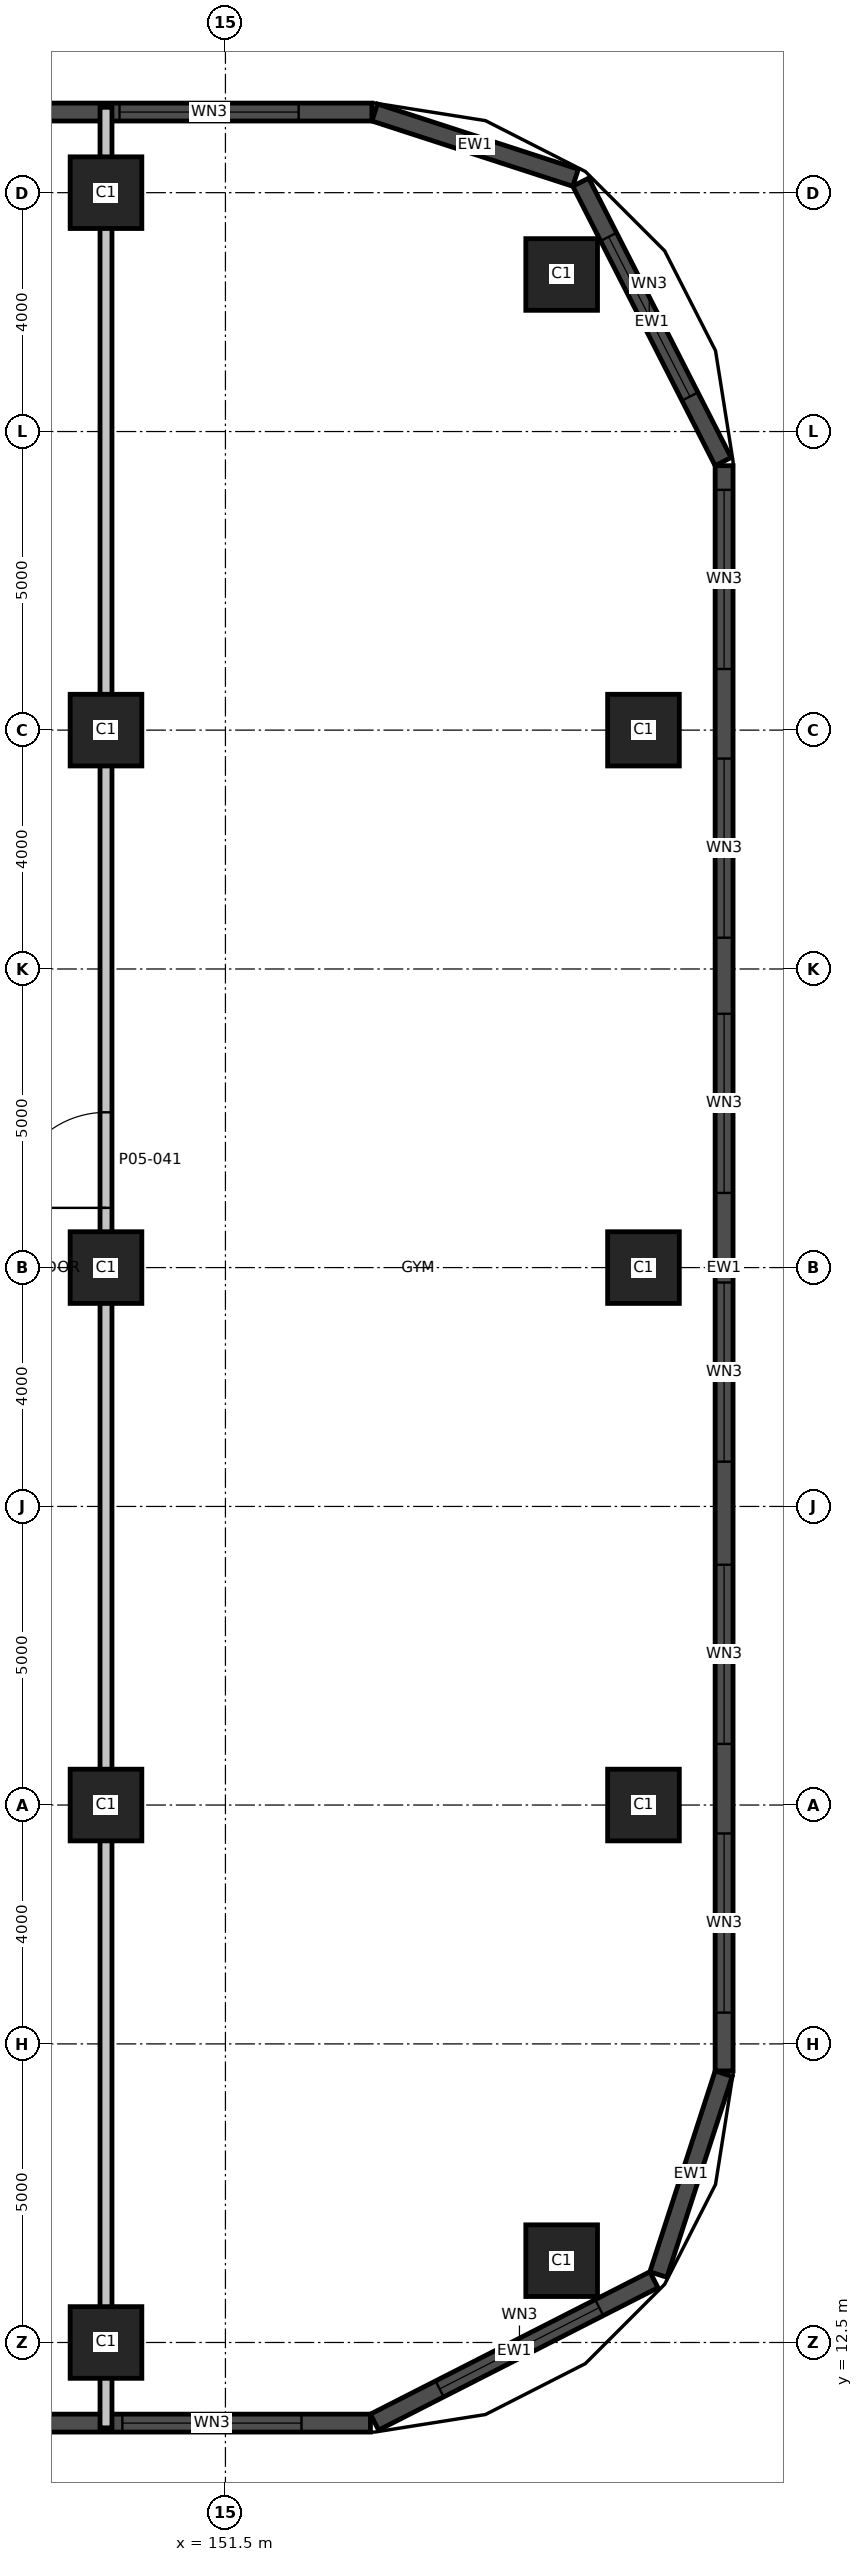
"""IFC4 building model, lengths in metres.
Left out: names, types, materials, properties, quantities, classifications, styles, units other than length and angle.
Written with IfcOpenShell. Run it as: python <this file> out.ifc"""

import sys

from ifc_helpers import new_model, si_unit, direction, frame, frame_2d, origin, origin_2d, place, context, subcontext, project, spatial, rectangle, extrude, element, fill, save


model = new_model("IFC4")
c1 = context("Model", 3, precision=1e-05, world=origin(), true_north=direction((0.0, 1.0)))
c2 = subcontext(c1, "Body", "Model", "MODEL_VIEW")
j1 = project(units=[si_unit("LENGTHUNIT", "METRE"), si_unit("PLANEANGLEUNIT", "RADIAN")], contexts=[c1])
p1 = place(None, origin())
s1 = spatial("IfcSite", under=j1, at=p1, CompositionType="ELEMENT")
p2 = place(p1, origin())
s2 = spatial("IfcBuilding", under=s1, at=p2, CompositionType="ELEMENT")
p3 = place(p2, frame((0.0, 0.0, 28.5)))
s3 = spatial("IfcBuildingStorey", under=s2, at=p3, CompositionType="ELEMENT", Elevation=28.5)
for number, where, z_axis, x_axis in (
    (1, (149.5, 12.5, 0.0), (0.0, 0.0, 1.0), (1.0, 0.0, 0.0)),
    (2, (157.13, 13.87, 0.0), (0.0, 0.0, 1.0), (1.0, 0.0, 0.0)),
    (3, (149.5, 21.5, 0.0), (0.0, 0.0, 1.0), (1.0, 0.0, 0.0)),
    (4, (158.5, 21.5, 0.0), (0.0, 0.0, 1.0), (1.0, 0.0, 0.0)),
    (5, (149.5, 30.5, 0.0), (0.0, 0.0, 1.0), (1.0, 0.0, 0.0)),
    (6, (158.5, 30.5, 0.0), (0.0, 0.0, 1.0), (1.0, 0.0, 0.0)),
    (7, (149.5, 39.5, 0.0), (0.0, 0.0, 1.0), (1.0, 0.0, 0.0)),
    (8, (158.5, 39.5, 0.0), (0.0, 0.0, 1.0), (1.0, 0.0, 0.0)),
    (9, (157.13, 47.13, 0.0), (0.0, 0.0, 1.0), (1.0, 0.0, 0.0)),
    (10, (149.5, 48.5, 0.0), (0.0, 0.0, 1.0), (1.0, 0.0, 0.0)),
):
    element("IfcColumn", number, at=place(p3, frame(where, z_axis=z_axis, x_axis=x_axis)), inside=s3, PredefinedType="COLUMN", context=c2, shape_type="SweptSolid", body=[
        extrude(rectangle(XDim=1.2, YDim=1.2, at=origin_2d()), origin(), (0.0, 0.0, 1.0), 5.0),
    ])
p4 = place(p3, frame((118.048, 11.15, 0.0), z_axis=(0.0, 0.0, 1.0), x_axis=(1.0, 0.0, 0.0)))
e11 = element("IfcWall", 11, at=p4, inside=s3, PredefinedType="SOLIDWALL", context=c2, shape_type="SweptSolid", body=[
    extrude(rectangle(XDim=35.88, YDim=0.3, at=frame_2d((17.94, 0.0))), origin(), (0.0, 0.0, 1.0), 4.7),
])
p5 = place(p4, frame((4.202, 0.0, 0.9)))
e12 = element("IfcOpeningElement", 12, at=p5, cuts=e11, PredefinedType="OPENING", context=c2, shape_type="SweptSolid", body=[
    extrude(rectangle(XDim=3.0, YDim=2.4, at=frame_2d((1.5, 1.2))), frame((0.0, 0.16, 0.0), z_axis=(0.0, -1.0, 0.0), x_axis=(1.0, 0.0, 0.0)), (0.0, 0.0, 1.0), 0.32),
])
p6 = place(p4, frame((8.702, 0.0, 0.9)))
e13 = element("IfcOpeningElement", 13, at=p6, cuts=e11, PredefinedType="OPENING", context=c2, shape_type="SweptSolid", body=[
    extrude(rectangle(XDim=3.0, YDim=2.4, at=frame_2d((1.5, 1.2))), frame((0.0, 0.16, 0.0), z_axis=(0.0, -1.0, 0.0), x_axis=(1.0, 0.0, 0.0)), (0.0, 0.0, 1.0), 0.32),
])
p7 = place(p4, frame((17.702, 0.0, 0.9)))
e14 = element("IfcOpeningElement", 14, at=p7, cuts=e11, PredefinedType="OPENING", context=c2, shape_type="SweptSolid", body=[
    extrude(rectangle(XDim=3.0, YDim=2.4, at=frame_2d((1.5, 1.2))), frame((0.0, 0.16, 0.0), z_axis=(0.0, -1.0, 0.0), x_axis=(1.0, 0.0, 0.0)), (0.0, 0.0, 1.0), 0.32),
])
p8 = place(p4, frame((31.726, 0.0, 0.9)))
e15 = element("IfcOpeningElement", 15, at=p8, cuts=e11, PredefinedType="OPENING", context=c2, shape_type="SweptSolid", body=[
    extrude(rectangle(XDim=3.0, YDim=2.4, at=frame_2d((1.5, 1.2))), frame((0.0, 0.16, 0.0), z_axis=(0.0, -1.0, 0.0), x_axis=(1.0, 0.0, 0.0)), (0.0, 0.0, 1.0), 0.32),
])
p9 = place(p3, frame((153.996, 11.166, 0.0), z_axis=(0.0, 0.0, 1.0), x_axis=(0.890998339455, 0.454006562826, 0.0)))
e16 = element("IfcWall", 16, at=p9, inside=s3, PredefinedType="SOLIDWALL", context=c2, shape_type="SweptSolid", body=[
    extrude(rectangle(XDim=5.252, YDim=0.3, at=frame_2d((2.626, 0.0))), origin(), (0.0, 0.0, 1.0), 4.7),
])
p10 = place(p9, frame((1.224, 0.0, 0.9)))
e17 = element("IfcOpeningElement", 17, at=p10, cuts=e16, PredefinedType="OPENING", context=c2, shape_type="SweptSolid", body=[
    extrude(rectangle(XDim=3.0, YDim=2.4, at=frame_2d((1.5, 1.2))), frame((0.0, 0.16, 0.0), z_axis=(0.0, -1.0, 0.0), x_axis=(1.0, 0.0, 0.0)), (0.0, 0.0, 1.0), 0.32),
])
p11 = place(p3, frame((158.75, 13.638, 0.0), z_axis=(0.0, 0.0, 1.0), x_axis=(0.309073584194, 0.951038127287, 0.0)))
e18 = element("IfcWall", 18, at=p11, inside=s3, PredefinedType="SOLIDWALL", context=c2, shape_type="SweptSolid", body=[
    extrude(rectangle(XDim=3.536, YDim=0.3, at=frame_2d((1.768, 0.0))), origin(), (0.0, 0.0, 1.0), 4.7),
])
p12 = place(p3, frame((159.85, 17.048, 0.0), z_axis=(0.0, 0.0, 1.0), x_axis=(0.0, 1.0, 0.0)))
e19 = element("IfcWall", 19, at=p12, inside=s3, PredefinedType="SOLIDWALL", context=c2, shape_type="SweptSolid", body=[
    extrude(rectangle(XDim=26.88, YDim=0.3, at=frame_2d((13.44, 0.0))), origin(), (0.0, 0.0, 1.0), 4.7),
])
p13 = place(p12, frame((0.976, 0.0, 0.9)))
e20 = element("IfcOpeningElement", 20, at=p13, cuts=e19, PredefinedType="OPENING", context=c2, shape_type="SweptSolid", body=[
    extrude(rectangle(XDim=3.0, YDim=2.4, at=frame_2d((1.5, 1.2))), frame((0.0, 0.16, 0.0), z_axis=(0.0, -1.0, 0.0), x_axis=(1.0, 0.0, 0.0)), (0.0, 0.0, 1.0), 0.32),
])
p14 = place(p12, frame((5.476, 0.0, 0.9)))
e21 = element("IfcOpeningElement", 21, at=p14, cuts=e19, PredefinedType="OPENING", context=c2, shape_type="SweptSolid", body=[
    extrude(rectangle(XDim=3.0, YDim=2.4, at=frame_2d((1.5, 1.2))), frame((0.0, 0.16, 0.0), z_axis=(0.0, -1.0, 0.0), x_axis=(1.0, 0.0, 0.0)), (0.0, 0.0, 1.0), 0.32),
])
p15 = place(p12, frame((10.202, 0.0, 0.9)))
e22 = element("IfcOpeningElement", 22, at=p15, cuts=e19, PredefinedType="OPENING", context=c2, shape_type="SweptSolid", body=[
    extrude(rectangle(XDim=3.0, YDim=2.4, at=frame_2d((1.5, 1.2))), frame((0.0, 0.16, 0.0), z_axis=(0.0, -1.0, 0.0), x_axis=(1.0, 0.0, 0.0)), (0.0, 0.0, 1.0), 0.32),
])
p16 = place(p12, frame((14.702, 0.0, 0.9)))
e23 = element("IfcOpeningElement", 23, at=p16, cuts=e19, PredefinedType="OPENING", context=c2, shape_type="SweptSolid", body=[
    extrude(rectangle(XDim=3.0, YDim=2.4, at=frame_2d((1.5, 1.2))), frame((0.0, 0.16, 0.0), z_axis=(0.0, -1.0, 0.0), x_axis=(1.0, 0.0, 0.0)), (0.0, 0.0, 1.0), 0.32),
])
p17 = place(p12, frame((18.976, 0.0, 0.9)))
e24 = element("IfcOpeningElement", 24, at=p17, cuts=e19, PredefinedType="OPENING", context=c2, shape_type="SweptSolid", body=[
    extrude(rectangle(XDim=3.0, YDim=2.4, at=frame_2d((1.5, 1.2))), frame((0.0, 0.16, 0.0), z_axis=(0.0, -1.0, 0.0), x_axis=(1.0, 0.0, 0.0)), (0.0, 0.0, 1.0), 0.32),
])
p18 = place(p12, frame((23.476, 0.0, 0.9)))
e25 = element("IfcOpeningElement", 25, at=p18, cuts=e19, PredefinedType="OPENING", context=c2, shape_type="SweptSolid", body=[
    extrude(rectangle(XDim=3.0, YDim=2.4, at=frame_2d((1.5, 1.2))), frame((0.0, 0.16, 0.0), z_axis=(0.0, -1.0, 0.0), x_axis=(1.0, 0.0, 0.0)), (0.0, 0.0, 1.0), 0.32),
])
p19 = place(p3, frame((159.834, 43.996, 0.0), z_axis=(0.0, 0.0, 1.0), x_axis=(-0.454006562826, 0.890998339455, 0.0)))
e26 = element("IfcWall", 26, at=p19, inside=s3, PredefinedType="SOLIDWALL", context=c2, shape_type="SweptSolid", body=[
    extrude(rectangle(XDim=5.252, YDim=0.3, at=frame_2d((2.626, 0.0))), origin(), (0.0, 0.0, 1.0), 4.7),
])
p20 = place(p19, frame((1.224, 0.0, 0.9)))
e27 = element("IfcOpeningElement", 27, at=p20, cuts=e26, PredefinedType="OPENING", context=c2, shape_type="SweptSolid", body=[
    extrude(rectangle(XDim=3.0, YDim=2.4, at=frame_2d((1.5, 1.2))), frame((0.0, 0.16, 0.0), z_axis=(0.0, -1.0, 0.0), x_axis=(1.0, 0.0, 0.0)), (0.0, 0.0, 1.0), 0.32),
])
p21 = place(p3, frame((157.362, 48.75, 0.0), z_axis=(0.0, 0.0, 1.0), x_axis=(-0.951038127287, 0.309073584194, 0.0)))
e28 = element("IfcWall", 28, at=p21, inside=s3, PredefinedType="SOLIDWALL", context=c2, shape_type="SweptSolid", body=[
    extrude(rectangle(XDim=3.536, YDim=0.3, at=frame_2d((1.768, 0.0))), origin(), (0.0, 0.0, 1.0), 4.7),
])
p22 = place(p3, frame((153.952, 49.85, 0.0), z_axis=(0.0, 0.0, 1.0), x_axis=(-1.0, 0.0, 0.0)))
e29 = element("IfcWall", 29, at=p22, inside=s3, PredefinedType="SOLIDWALL", context=c2, shape_type="SweptSolid", body=[
    extrude(rectangle(XDim=35.88, YDim=0.3, at=frame_2d((17.94, 0.0))), origin(), (0.0, 0.0, 1.0), 4.7),
])
p23 = place(p22, frame((1.226, 0.0, 0.9)))
e30 = element("IfcOpeningElement", 30, at=p23, cuts=e29, PredefinedType="OPENING", context=c2, shape_type="SweptSolid", body=[
    extrude(rectangle(XDim=3.0, YDim=2.4, at=frame_2d((1.5, 1.2))), frame((0.0, 0.16, 0.0), z_axis=(0.0, -1.0, 0.0), x_axis=(1.0, 0.0, 0.0)), (0.0, 0.0, 1.0), 0.32),
])
p24 = place(p22, frame((10.702, 0.0, 0.9)))
e31 = element("IfcOpeningElement", 31, at=p24, cuts=e29, PredefinedType="OPENING", context=c2, shape_type="SweptSolid", body=[
    extrude(rectangle(XDim=3.0, YDim=2.4, at=frame_2d((1.5, 1.2))), frame((0.0, 0.16, 0.0), z_axis=(0.0, -1.0, 0.0), x_axis=(1.0, 0.0, 0.0)), (0.0, 0.0, 1.0), 0.32),
])
p25 = place(p22, frame((19.702, 0.0, 0.9)))
e32 = element("IfcOpeningElement", 32, at=p25, cuts=e29, PredefinedType="OPENING", context=c2, shape_type="SweptSolid", body=[
    extrude(rectangle(XDim=3.0, YDim=2.4, at=frame_2d((1.5, 1.2))), frame((0.0, 0.16, 0.0), z_axis=(0.0, -1.0, 0.0), x_axis=(1.0, 0.0, 0.0)), (0.0, 0.0, 1.0), 0.32),
])
p26 = place(p22, frame((24.202, 0.0, 0.9)))
e33 = element("IfcOpeningElement", 33, at=p26, cuts=e29, PredefinedType="OPENING", context=c2, shape_type="SweptSolid", body=[
    extrude(rectangle(XDim=3.0, YDim=2.4, at=frame_2d((1.5, 1.2))), frame((0.0, 0.16, 0.0), z_axis=(0.0, -1.0, 0.0), x_axis=(1.0, 0.0, 0.0)), (0.0, 0.0, 1.0), 0.32),
])
p27 = place(p22, frame((28.702, 0.0, 0.9)))
e34 = element("IfcOpeningElement", 34, at=p27, cuts=e29, PredefinedType="OPENING", context=c2, shape_type="SweptSolid", body=[
    extrude(rectangle(XDim=3.0, YDim=2.4, at=frame_2d((1.5, 1.2))), frame((0.0, 0.16, 0.0), z_axis=(0.0, -1.0, 0.0), x_axis=(1.0, 0.0, 0.0)), (0.0, 0.0, 1.0), 0.32),
])
p28 = place(p3, frame((149.5, 11.07, 0.0), z_axis=(0.0, 0.0, 1.0), x_axis=(0.0, 1.0, 0.0)))
e35 = element("IfcWall", 35, at=p28, inside=s3, PredefinedType="PARTITIONING", context=c2, shape_type="SweptSolid", body=[
    extrude(rectangle(XDim=38.86, YDim=0.2, at=frame_2d((19.43, 0.0))), origin(), (0.0, 0.0, 1.0), 3.8),
])
p29 = place(p28, frame((20.43, 0.0, 0.0)))
e36 = element("IfcOpeningElement", 36, at=p29, cuts=e35, PredefinedType="OPENING", context=c2, shape_type="SweptSolid", body=[
    extrude(rectangle(XDim=1.6, YDim=2.1, at=frame_2d((0.8, 1.05))), frame((0.0, 0.11, 0.0), z_axis=(0.0, -1.0, 0.0), x_axis=(1.0, 0.0, 0.0)), (0.0, 0.0, 1.0), 0.22),
])
p30 = place(p8, origin())
e37 = element("IfcWindow", 37, at=p30, inside=s3, PartitioningType="SINGLE_PANEL", PredefinedType="WINDOW", context=c2, shape_type="SweptSolid", body=[
    extrude(rectangle(XDim=3.0, YDim=2.4, at=frame_2d((1.5, 1.2))), frame((0.0, 0.03, 0.0), z_axis=(0.0, -1.0, 0.0), x_axis=(1.0, 0.0, 0.0)), (0.0, 0.0, 1.0), 0.06),
])
fill(e15, e37)
p31 = place(p10, origin())
e38 = element("IfcWindow", 38, at=p31, inside=s3, PartitioningType="SINGLE_PANEL", PredefinedType="WINDOW", context=c2, shape_type="SweptSolid", body=[
    extrude(rectangle(XDim=3.0, YDim=2.4, at=frame_2d((1.5, 1.2))), frame((0.0, 0.03, 0.0), z_axis=(0.0, -1.0, 0.0), x_axis=(1.0, 0.0, 0.0)), (0.0, 0.0, 1.0), 0.06),
])
fill(e17, e38)
p32 = place(p13, origin())
e39 = element("IfcWindow", 39, at=p32, inside=s3, PartitioningType="SINGLE_PANEL", PredefinedType="WINDOW", context=c2, shape_type="SweptSolid", body=[
    extrude(rectangle(XDim=3.0, YDim=2.4, at=frame_2d((1.5, 1.2))), frame((0.0, 0.03, 0.0), z_axis=(0.0, -1.0, 0.0), x_axis=(1.0, 0.0, 0.0)), (0.0, 0.0, 1.0), 0.06),
])
fill(e20, e39)
p33 = place(p14, origin())
e40 = element("IfcWindow", 40, at=p33, inside=s3, PartitioningType="SINGLE_PANEL", PredefinedType="WINDOW", context=c2, shape_type="SweptSolid", body=[
    extrude(rectangle(XDim=3.0, YDim=2.4, at=frame_2d((1.5, 1.2))), frame((0.0, 0.03, 0.0), z_axis=(0.0, -1.0, 0.0), x_axis=(1.0, 0.0, 0.0)), (0.0, 0.0, 1.0), 0.06),
])
fill(e21, e40)
p34 = place(p15, origin())
e41 = element("IfcWindow", 41, at=p34, inside=s3, PartitioningType="SINGLE_PANEL", PredefinedType="WINDOW", context=c2, shape_type="SweptSolid", body=[
    extrude(rectangle(XDim=3.0, YDim=2.4, at=frame_2d((1.5, 1.2))), frame((0.0, 0.03, 0.0), z_axis=(0.0, -1.0, 0.0), x_axis=(1.0, 0.0, 0.0)), (0.0, 0.0, 1.0), 0.06),
])
fill(e22, e41)
p35 = place(p16, origin())
e42 = element("IfcWindow", 42, at=p35, inside=s3, PartitioningType="SINGLE_PANEL", PredefinedType="WINDOW", context=c2, shape_type="SweptSolid", body=[
    extrude(rectangle(XDim=3.0, YDim=2.4, at=frame_2d((1.5, 1.2))), frame((0.0, 0.03, 0.0), z_axis=(0.0, -1.0, 0.0), x_axis=(1.0, 0.0, 0.0)), (0.0, 0.0, 1.0), 0.06),
])
fill(e23, e42)
p36 = place(p17, origin())
e43 = element("IfcWindow", 43, at=p36, inside=s3, PartitioningType="SINGLE_PANEL", PredefinedType="WINDOW", context=c2, shape_type="SweptSolid", body=[
    extrude(rectangle(XDim=3.0, YDim=2.4, at=frame_2d((1.5, 1.2))), frame((0.0, 0.03, 0.0), z_axis=(0.0, -1.0, 0.0), x_axis=(1.0, 0.0, 0.0)), (0.0, 0.0, 1.0), 0.06),
])
fill(e24, e43)
p37 = place(p18, origin())
e44 = element("IfcWindow", 44, at=p37, inside=s3, PartitioningType="SINGLE_PANEL", PredefinedType="WINDOW", context=c2, shape_type="SweptSolid", body=[
    extrude(rectangle(XDim=3.0, YDim=2.4, at=frame_2d((1.5, 1.2))), frame((0.0, 0.03, 0.0), z_axis=(0.0, -1.0, 0.0), x_axis=(1.0, 0.0, 0.0)), (0.0, 0.0, 1.0), 0.06),
])
fill(e25, e44)
p38 = place(p20, origin())
e45 = element("IfcWindow", 45, at=p38, inside=s3, PartitioningType="SINGLE_PANEL", PredefinedType="WINDOW", context=c2, shape_type="SweptSolid", body=[
    extrude(rectangle(XDim=3.0, YDim=2.4, at=frame_2d((1.5, 1.2))), frame((0.0, 0.03, 0.0), z_axis=(0.0, -1.0, 0.0), x_axis=(1.0, 0.0, 0.0)), (0.0, 0.0, 1.0), 0.06),
])
fill(e27, e45)
p39 = place(p23, origin())
e46 = element("IfcWindow", 46, at=p39, inside=s3, PartitioningType="SINGLE_PANEL", PredefinedType="WINDOW", context=c2, shape_type="SweptSolid", body=[
    extrude(rectangle(XDim=3.0, YDim=2.4, at=frame_2d((1.5, 1.2))), frame((0.0, 0.03, 0.0), z_axis=(0.0, -1.0, 0.0), x_axis=(1.0, 0.0, 0.0)), (0.0, 0.0, 1.0), 0.06),
])
fill(e30, e46)
p40 = place(p29, origin())
e47 = element("IfcDoor", 47, at=p40, inside=s3, OperationType="SINGLE_SWING_LEFT", PredefinedType="DOOR", context=c2, shape_type="SweptSolid", body=[
    extrude(rectangle(XDim=1.6, YDim=2.1, at=frame_2d((0.8, 1.05))), frame((0.0, 0.025, 0.0), z_axis=(0.0, -1.0, 0.0), x_axis=(1.0, 0.0, 0.0)), (0.0, 0.0, 1.0), 0.05),
])
fill(e36, e47)
save(model, sys.argv[1])
